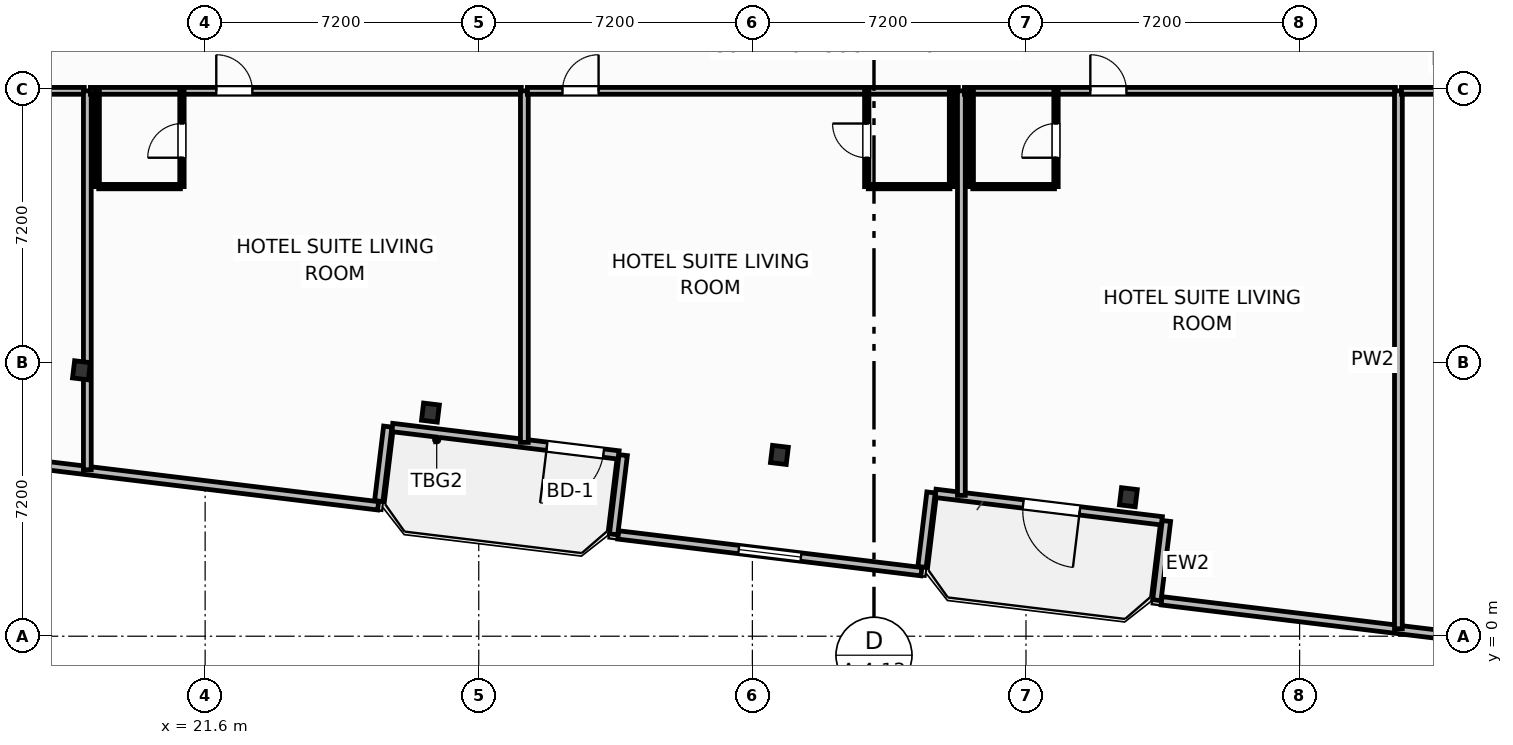
"""IFC4 building model, lengths in metres.
Left out: names, types, materials, properties, quantities, classifications, styles, units other than length and angle.
Written with IfcOpenShell. Run it as: python <this file> out.ifc"""

import sys

from ifc_helpers import new_model, si_unit, direction, frame, frame_2d, origin, origin_2d, place, context, subcontext, project, spatial, rectangle, i_section, extrude, element, fill, save


model = new_model("IFC4")
c1 = context("Model", 3, precision=1e-05, world=origin(), true_north=direction((0.0, 1.0)))
c2 = subcontext(c1, "Body", "Model", "MODEL_VIEW")
j1 = project(units=[si_unit("LENGTHUNIT", "METRE"), si_unit("PLANEANGLEUNIT", "RADIAN")], contexts=[c1])
p1 = place(None, origin())
s1 = spatial("IfcSite", under=j1, at=p1, CompositionType="ELEMENT")
p2 = place(p1, origin())
s2 = spatial("IfcBuilding", under=s1, at=p2, CompositionType="ELEMENT")
p3 = place(p2, frame((0.0, 0.0, 140.2)))
s3 = spatial("IfcBuildingStorey", under=s2, at=p3, CompositionType="ELEMENT", Elevation=140.2)
for number, where, z_axis, x_axis in (
    (1, (18.346, 6.997, 0.0), (0.0, 0.0, 1.0), (0.993, -0.12, 0.0)),
    (2, (27.529, 5.884, 0.0), (0.0, 0.0, 1.0), (0.993, -0.12, 0.0)),
    (3, (36.711, 4.77, 0.0), (0.0, 0.0, 1.0), (0.993, -0.12, 0.0)),
    (4, (45.894, 3.657, 0.0), (0.0, 0.0, 1.0), (0.993, -0.12, 0.0)),
):
    element("IfcColumn", number, at=place(p3, frame(where, z_axis=z_axis, x_axis=x_axis)), inside=s3, PredefinedType="COLUMN", context=c2, shape_type="SweptSolid", body=[
        extrude(i_section(OverallWidth=0.418, OverallDepth=0.455, WebThickness=0.042, FlangeThickness=0.068, FilletRadius=0.025, at=origin_2d()), origin(), (0.0, 0.0, 1.0), 3.7),
    ])
p4 = place(p3, frame((32.48, 4.77, 0.0), z_axis=(0.0, 0.0, 1.0), x_axis=(-0.992735402148, 0.120318000826, 0.0)))
e5 = element("IfcWall", 5, at=p4, inside=s3, PredefinedType="SOLIDWALL", context=c2, shape_type="SweptSolid", body=[
    extrude(rectangle(XDim=6.0, YDim=0.22, at=frame_2d((3.0, 0.0))), origin(), (0.0, 0.0, 1.0), 2.73),
])
p5 = place(p4, frame((0.4, 0.0, 0.0)))
e6 = element("IfcOpeningElement", 6, at=p5, cuts=e5, PredefinedType="OPENING", context=c2, shape_type="SweptSolid", body=[
    extrude(rectangle(XDim=1.5, YDim=2.25, at=frame_2d((0.75, 1.125))), frame((0.0, 0.12, 0.0), z_axis=(0.0, -1.0, 0.0), x_axis=(1.0, 0.0, 0.0)), (0.0, 0.0, 1.0), 0.24),
])
p6 = place(p3, frame((46.776, 3.037, 0.0), z_axis=(0.0, 0.0, 1.0), x_axis=(-0.992735402148, 0.120318000826, 0.0)))
e7 = element("IfcWall", 7, at=p6, inside=s3, PredefinedType="SOLIDWALL", context=c2, shape_type="SweptSolid", body=[
    extrude(rectangle(XDim=6.0, YDim=0.22, at=frame_2d((3.0, 0.0))), origin(), (0.0, 0.0, 1.0), 2.73),
])
p7 = place(p6, frame((2.176, 0.0, 0.0)))
e8 = element("IfcOpeningElement", 8, at=p7, cuts=e7, PredefinedType="OPENING", context=c2, shape_type="SweptSolid", body=[
    extrude(rectangle(XDim=1.5, YDim=2.25, at=frame_2d((0.75, 1.125))), frame((0.0, 0.12, 0.0), z_axis=(0.0, -1.0, 0.0), x_axis=(1.0, 0.0, 0.0)), (0.0, 0.0, 1.0), 0.24),
])
p8 = place(p3, frame((4.862, 6.012, 0.0), z_axis=(0.0, 0.0, 1.0), x_axis=(0.99273213367, -0.120344965739, 0.0)))
e9 = element("IfcWall", 9, at=p8, inside=s3, PredefinedType="SOLIDWALL", context=c2, shape_type="SweptSolid", body=[
    extrude(rectangle(XDim=21.447, YDim=0.22, at=frame_2d((10.724, 0.0))), origin(), (0.0, 0.0, 1.0), 2.73),
])
p9 = place(p8, frame((9.899, 0.0, 0.8)))
e10 = element("IfcOpeningElement", 10, at=p9, cuts=e9, PredefinedType="OPENING", context=c2, shape_type="SweptSolid", body=[
    extrude(rectangle(XDim=1.65, YDim=1.65, at=frame_2d((0.825, 0.825))), frame((0.0, 0.12, 0.0), z_axis=(0.0, -1.0, 0.0), x_axis=(1.0, 0.0, 0.0)), (0.0, 0.0, 1.0), 0.24),
])
p10 = place(p3, frame((26.168, 3.555, 0.0), z_axis=(0.0, 0.0, 1.0), x_axis=(0.120290754542, 0.992738703976, 0.0)))
e11 = element("IfcWall", 11, at=p10, inside=s3, PredefinedType="SOLIDWALL", context=c2, shape_type="SweptSolid", body=[
    extrude(rectangle(XDim=1.975, YDim=0.22, at=frame_2d((0.987, 0.0))), origin(), (0.0, 0.0, 1.0), 2.73),
])
p11 = place(p3, frame((32.601, 4.765, 0.0), z_axis=(0.0, 0.0, 1.0), x_axis=(-0.120327895535, -0.992734202874, 0.0)))
e12 = element("IfcWall", 12, at=p11, inside=s3, PredefinedType="SOLIDWALL", context=c2, shape_type="SweptSolid", body=[
    extrude(rectangle(XDim=2.1, YDim=0.22, at=frame_2d((1.05, 0.0))), origin(), (0.0, 0.0, 1.0), 2.73),
])
p12 = place(p3, frame((32.472, 2.665, 0.0), z_axis=(0.0, 0.0, 1.0), x_axis=(0.992734661931, -0.120324108143, 0.0)))
e13 = element("IfcWall", 13, at=p12, inside=s3, PredefinedType="SOLIDWALL", context=c2, shape_type="SweptSolid", body=[
    extrude(rectangle(XDim=8.035, YDim=0.22, at=frame_2d((4.018, 0.0))), origin(), (0.0, 0.0, 1.0), 2.73),
])
p13 = place(p12, frame((3.192, 0.0, 0.8)))
e14 = element("IfcOpeningElement", 14, at=p13, cuts=e13, PredefinedType="OPENING", context=c2, shape_type="SweptSolid", body=[
    extrude(rectangle(XDim=1.65, YDim=1.65, at=frame_2d((0.825, 0.825))), frame((0.0, 0.12, 0.0), z_axis=(0.0, -1.0, 0.0), x_axis=(1.0, 0.0, 0.0)), (0.0, 0.0, 1.0), 0.24),
])
p14 = place(p3, frame((40.464, 1.822, 0.0), z_axis=(0.0, 0.0, 1.0), x_axis=(0.120275992932, 0.992740492538, 0.0)))
e15 = element("IfcWall", 15, at=p14, inside=s3, PredefinedType="SOLIDWALL", context=c2, shape_type="SweptSolid", body=[
    extrude(rectangle(XDim=1.975, YDim=0.22, at=frame_2d((0.988, 0.0))), origin(), (0.0, 0.0, 1.0), 2.73),
])
p15 = place(p3, frame((46.896, 3.032, 0.0), z_axis=(0.0, 0.0, 1.0), x_axis=(-0.120327895535, -0.992734202874, 0.0)))
e16 = element("IfcWall", 16, at=p15, inside=s3, PredefinedType="SOLIDWALL", context=c2, shape_type="SweptSolid", body=[
    extrude(rectangle(XDim=2.1, YDim=0.22, at=frame_2d((1.05, 0.0))), origin(), (0.0, 0.0, 1.0), 2.73),
])
p16 = place(p3, frame((46.768, 0.932, 0.0), z_axis=(0.0, 0.0, 1.0), x_axis=(0.992733036814, -0.120337515419, 0.0)))
e17 = element("IfcWall", 17, at=p16, inside=s3, PredefinedType="SOLIDWALL", context=c2, shape_type="SweptSolid", body=[
    extrude(rectangle(XDim=21.347, YDim=0.22, at=frame_2d((10.673, 0.0))), origin(), (0.0, 0.0, 1.0), 2.73),
])
p17 = place(p16, frame((9.849, 0.0, 0.8)))
e18 = element("IfcOpeningElement", 18, at=p17, cuts=e17, PredefinedType="OPENING", context=c2, shape_type="SweptSolid", body=[
    extrude(rectangle(XDim=1.65, YDim=1.65, at=frame_2d((0.825, 0.825))), frame((0.0, 0.12, 0.0), z_axis=(0.0, -1.0, 0.0), x_axis=(1.0, 0.0, 0.0)), (0.0, 0.0, 1.0), 0.24),
])
p18 = place(p3, frame((0.581, 14.35, 0.0), z_axis=(0.0, 0.0, 1.0), x_axis=(1.0, 0.0, 0.0)))
e19 = element("IfcWall", 19, at=p18, inside=s3, PredefinedType="PARTITIONING", context=c2, shape_type="SweptSolid", body=[
    extrude(rectangle(XDim=17.839, YDim=0.18, at=frame_2d((8.919, 0.0))), origin(), (0.0, 0.0, 1.0), 3.45),
])
p19 = place(p18, frame((14.196, 0.0, 0.0)))
e20 = element("IfcOpeningElement", 20, at=p19, cuts=e19, PredefinedType="OPENING", context=c2, shape_type="SweptSolid", body=[
    extrude(rectangle(XDim=0.95, YDim=2.15, at=frame_2d((0.475, 1.075))), frame((0.0, 0.1, 0.0), z_axis=(0.0, -1.0, 0.0), x_axis=(1.0, 0.0, 0.0)), (0.0, 0.0, 1.0), 0.2),
])
p20 = place(p3, frame((18.5, 4.379, 0.0), z_axis=(0.0, 0.0, 1.0), x_axis=(0.0, 1.0, 0.0)))
e21 = element("IfcWall", 21, at=p20, inside=s3, PredefinedType="PARTITIONING", context=c2, shape_type="SweptSolid", body=[
    extrude(rectangle(XDim=9.971, YDim=0.205, at=frame_2d((4.985, 0.0))), origin(), (0.0, 0.0, 1.0), 3.45),
])
p21 = place(p3, frame((18.58, 14.35, 0.0), z_axis=(0.0, 0.0, 1.0), x_axis=(1.0, 0.0, 0.0)))
e22 = element("IfcWall", 22, at=p21, inside=s3, PredefinedType="PARTITIONING", context=c2, shape_type="SweptSolid", body=[
    extrude(rectangle(XDim=11.34, YDim=0.18, at=frame_2d((5.67, 0.0))), origin(), (0.0, 0.0, 1.0), 3.45),
])
p22 = place(p21, frame((3.313, 0.0, 0.0)))
e23 = element("IfcOpeningElement", 23, at=p22, cuts=e22, PredefinedType="OPENING", context=c2, shape_type="SweptSolid", body=[
    extrude(rectangle(XDim=0.95, YDim=2.15, at=frame_2d((0.475, 1.075))), frame((0.0, 0.1, 0.0), z_axis=(0.0, -1.0, 0.0), x_axis=(1.0, 0.0, 0.0)), (0.0, 0.0, 1.0), 0.2),
])
p23 = place(p3, frame((18.8, 11.83, 0.0), z_axis=(0.0, 0.0, 1.0), x_axis=(1.0, 0.0, 0.0)))
e24 = element("IfcWall", 24, at=p23, inside=s3, PredefinedType="PARTITIONING", context=c2, shape_type="SweptSolid", body=[
    extrude(rectangle(XDim=2.15, YDim=0.115, at=frame_2d((1.075, 0.0))), origin(), (0.0, 0.0, 1.0), 3.45),
])
p24 = place(p3, frame((20.99, 11.83, 0.0), z_axis=(0.0, 0.0, 1.0), x_axis=(0.0, 1.0, 0.0)))
e25 = element("IfcWall", 25, at=p24, inside=s3, PredefinedType="PARTITIONING", context=c2, shape_type="SweptSolid", body=[
    extrude(rectangle(XDim=2.52, YDim=0.115, at=frame_2d((1.26, 0.0))), origin(), (0.0, 0.0, 1.0), 3.45),
])
p25 = place(p24, frame((0.76, 0.0, 0.0)))
e26 = element("IfcOpeningElement", 26, at=p25, cuts=e25, PredefinedType="OPENING", context=c2, shape_type="SweptSolid", body=[
    extrude(rectangle(XDim=0.9, YDim=2.05, at=frame_2d((0.45, 1.025))), frame((0.0, 0.067, 0.0), z_axis=(0.0, -1.0, 0.0), x_axis=(1.0, 0.0, 0.0)), (0.0, 0.0, 1.0), 0.135),
])
p26 = place(p3, frame((18.76, 11.83, 0.0), z_axis=(0.0, 0.0, 1.0), x_axis=(0.0, 1.0, 0.0)))
e27 = element("IfcWall", 27, at=p26, inside=s3, PredefinedType="PARTITIONING", context=c2, shape_type="SweptSolid", body=[
    extrude(rectangle(XDim=2.52, YDim=0.115, at=frame_2d((1.26, 0.0))), origin(), (0.0, 0.0, 1.0), 3.45),
])
p27 = place(p3, frame((30.0, 5.1, 0.0), z_axis=(0.0, 0.0, 1.0), x_axis=(0.0, 1.0, 0.0)))
e28 = element("IfcWall", 28, at=p27, inside=s3, PredefinedType="PARTITIONING", context=c2, shape_type="SweptSolid", body=[
    extrude(rectangle(XDim=9.25, YDim=0.205, at=frame_2d((4.625, 0.0))), origin(), (0.0, 0.0, 1.0), 3.45),
])
p28 = place(p3, frame((30.08, 14.35, 0.0), z_axis=(0.0, 0.0, 1.0), x_axis=(1.0, 0.0, 0.0)))
e29 = element("IfcWall", 29, at=p28, inside=s3, PredefinedType="PARTITIONING", context=c2, shape_type="SweptSolid", body=[
    extrude(rectangle(XDim=11.34, YDim=0.18, at=frame_2d((5.67, 0.0))), origin(), (0.0, 0.0, 1.0), 3.45),
])
p29 = place(p28, frame((0.923, 0.0, 0.0)))
e30 = element("IfcOpeningElement", 30, at=p29, cuts=e29, PredefinedType="OPENING", context=c2, shape_type="SweptSolid", body=[
    extrude(rectangle(XDim=0.95, YDim=2.15, at=frame_2d((0.475, 1.075))), frame((0.0, 0.1, 0.0), z_axis=(0.0, -1.0, 0.0), x_axis=(1.0, 0.0, 0.0)), (0.0, 0.0, 1.0), 0.2),
])
p30 = place(p3, frame((39.05, 11.83, 0.0), z_axis=(0.0, 0.0, 1.0), x_axis=(1.0, 0.0, 0.0)))
e31 = element("IfcWall", 31, at=p30, inside=s3, PredefinedType="PARTITIONING", context=c2, shape_type="SweptSolid", body=[
    extrude(rectangle(XDim=2.15, YDim=0.115, at=frame_2d((1.075, 0.0))), origin(), (0.0, 0.0, 1.0), 3.45),
])
p31 = place(p3, frame((39.01, 11.83, 0.0), z_axis=(0.0, 0.0, 1.0), x_axis=(0.0, 1.0, 0.0)))
e32 = element("IfcWall", 32, at=p31, inside=s3, PredefinedType="PARTITIONING", context=c2, shape_type="SweptSolid", body=[
    extrude(rectangle(XDim=2.52, YDim=0.115, at=frame_2d((1.26, 0.0))), origin(), (0.0, 0.0, 1.0), 3.45),
])
p32 = place(p31, frame((0.76, 0.0, 0.0)))
e33 = element("IfcOpeningElement", 33, at=p32, cuts=e32, PredefinedType="OPENING", context=c2, shape_type="SweptSolid", body=[
    extrude(rectangle(XDim=0.9, YDim=2.05, at=frame_2d((0.45, 1.025))), frame((0.0, 0.067, 0.0), z_axis=(0.0, -1.0, 0.0), x_axis=(1.0, 0.0, 0.0)), (0.0, 0.0, 1.0), 0.135),
])
p33 = place(p3, frame((41.24, 11.83, 0.0), z_axis=(0.0, 0.0, 1.0), x_axis=(0.0, 1.0, 0.0)))
e34 = element("IfcWall", 34, at=p33, inside=s3, PredefinedType="PARTITIONING", context=c2, shape_type="SweptSolid", body=[
    extrude(rectangle(XDim=2.52, YDim=0.115, at=frame_2d((1.26, 0.0))), origin(), (0.0, 0.0, 1.0), 3.45),
])
p34 = place(p3, frame((41.5, 3.706, 0.0), z_axis=(0.0, 0.0, 1.0), x_axis=(0.0, 1.0, 0.0)))
e35 = element("IfcWall", 35, at=p34, inside=s3, PredefinedType="PARTITIONING", context=c2, shape_type="SweptSolid", body=[
    extrude(rectangle(XDim=10.644, YDim=0.205, at=frame_2d((5.322, 0.0))), origin(), (0.0, 0.0, 1.0), 3.45),
])
p35 = place(p3, frame((41.58, 14.35, 0.0), z_axis=(0.0, 0.0, 1.0), x_axis=(1.0, 0.0, 0.0)))
e36 = element("IfcWall", 36, at=p35, inside=s3, PredefinedType="PARTITIONING", context=c2, shape_type="SweptSolid", body=[
    extrude(rectangle(XDim=11.34, YDim=0.18, at=frame_2d((5.67, 0.0))), origin(), (0.0, 0.0, 1.0), 3.45),
])
p36 = place(p35, frame((3.313, 0.0, 0.0)))
e37 = element("IfcOpeningElement", 37, at=p36, cuts=e36, PredefinedType="OPENING", context=c2, shape_type="SweptSolid", body=[
    extrude(rectangle(XDim=0.95, YDim=2.15, at=frame_2d((0.475, 1.075))), frame((0.0, 0.1, 0.0), z_axis=(0.0, -1.0, 0.0), x_axis=(1.0, 0.0, 0.0)), (0.0, 0.0, 1.0), 0.2),
])
p37 = place(p3, frame((41.8, 11.83, 0.0), z_axis=(0.0, 0.0, 1.0), x_axis=(1.0, 0.0, 0.0)))
e38 = element("IfcWall", 38, at=p37, inside=s3, PredefinedType="PARTITIONING", context=c2, shape_type="SweptSolid", body=[
    extrude(rectangle(XDim=2.15, YDim=0.115, at=frame_2d((1.075, 0.0))), origin(), (0.0, 0.0, 1.0), 3.45),
])
p38 = place(p3, frame((43.99, 11.83, 0.0), z_axis=(0.0, 0.0, 1.0), x_axis=(0.0, 1.0, 0.0)))
e39 = element("IfcWall", 39, at=p38, inside=s3, PredefinedType="PARTITIONING", context=c2, shape_type="SweptSolid", body=[
    extrude(rectangle(XDim=2.52, YDim=0.115, at=frame_2d((1.26, 0.0))), origin(), (0.0, 0.0, 1.0), 3.45),
])
p39 = place(p38, frame((0.76, 0.0, 0.0)))
e40 = element("IfcOpeningElement", 40, at=p39, cuts=e39, PredefinedType="OPENING", context=c2, shape_type="SweptSolid", body=[
    extrude(rectangle(XDim=0.9, YDim=2.05, at=frame_2d((0.45, 1.025))), frame((0.0, 0.067, 0.0), z_axis=(0.0, -1.0, 0.0), x_axis=(1.0, 0.0, 0.0)), (0.0, 0.0, 1.0), 0.135),
])
p40 = place(p3, frame((41.76, 11.83, 0.0), z_axis=(0.0, 0.0, 1.0), x_axis=(0.0, 1.0, 0.0)))
e41 = element("IfcWall", 41, at=p40, inside=s3, PredefinedType="PARTITIONING", context=c2, shape_type="SweptSolid", body=[
    extrude(rectangle(XDim=2.52, YDim=0.115, at=frame_2d((1.26, 0.0))), origin(), (0.0, 0.0, 1.0), 3.45),
])
p41 = place(p3, frame((53.0, 0.197, 0.0), z_axis=(0.0, 0.0, 1.0), x_axis=(0.0, 1.0, 0.0)))
e42 = element("IfcWall", 42, at=p41, inside=s3, PredefinedType="PARTITIONING", context=c2, shape_type="SweptSolid", body=[
    extrude(rectangle(XDim=14.153, YDim=0.205, at=frame_2d((7.077, 0.0))), origin(), (0.0, 0.0, 1.0), 3.45),
])
p42 = place(p3, frame((53.08, 14.35, 0.0), z_axis=(0.0, 0.0, 1.0), x_axis=(1.0, 0.0, 0.0)))
e43 = element("IfcWall", 43, at=p42, inside=s3, PredefinedType="PARTITIONING", context=c2, shape_type="SweptSolid", body=[
    extrude(rectangle(XDim=22.084, YDim=0.18, at=frame_2d((11.042, 0.0))), origin(), (0.0, 0.0, 1.0), 3.45),
])
p43 = place(p42, frame((0.937, 0.0, 0.0)))
e44 = element("IfcOpeningElement", 44, at=p43, cuts=e43, PredefinedType="OPENING", context=c2, shape_type="SweptSolid", body=[
    extrude(rectangle(XDim=0.95, YDim=2.15, at=frame_2d((0.475, 1.075))), frame((0.0, 0.1, 0.0), z_axis=(0.0, -1.0, 0.0), x_axis=(1.0, 0.0, 0.0)), (0.0, 0.0, 1.0), 0.2),
])
p44 = place(p5, origin())
e45 = element("IfcDoor", 45, at=p44, inside=s3, OperationType="SINGLE_SWING_RIGHT", PredefinedType="DOOR", context=c2, shape_type="SweptSolid", body=[
    extrude(rectangle(XDim=1.5, YDim=2.25, at=frame_2d((0.75, 1.125))), frame((0.0, 0.025, 0.0), z_axis=(0.0, -1.0, 0.0), x_axis=(1.0, 0.0, 0.0)), (0.0, 0.0, 1.0), 0.05),
])
fill(e6, e45)
p45 = place(p7, origin())
e46 = element("IfcDoor", 46, at=p45, inside=s3, OperationType="SINGLE_SWING_LEFT", PredefinedType="DOOR", context=c2, shape_type="SweptSolid", body=[
    extrude(rectangle(XDim=1.5, YDim=2.25, at=frame_2d((0.75, 1.125))), frame((0.0, 0.025, 0.0), z_axis=(0.0, -1.0, 0.0), x_axis=(1.0, 0.0, 0.0)), (0.0, 0.0, 1.0), 0.05),
])
fill(e8, e46)
p46 = place(p13, origin())
e47 = element("IfcWindow", 47, at=p46, inside=s3, PartitioningType="SINGLE_PANEL", PredefinedType="WINDOW", context=c2, shape_type="SweptSolid", body=[
    extrude(rectangle(XDim=1.65, YDim=1.65, at=frame_2d((0.825, 0.825))), frame((0.0, 0.03, 0.0), z_axis=(0.0, -1.0, 0.0), x_axis=(1.0, 0.0, 0.0)), (0.0, 0.0, 1.0), 0.06),
])
fill(e14, e47)
p47 = place(p22, origin())
e48 = element("IfcDoor", 48, at=p47, inside=s3, OperationType="SINGLE_SWING_LEFT", PredefinedType="DOOR", context=c2, shape_type="SweptSolid", body=[
    extrude(rectangle(XDim=0.95, YDim=2.15, at=frame_2d((0.475, 1.075))), frame((0.0, 0.025, 0.0), z_axis=(0.0, -1.0, 0.0), x_axis=(1.0, 0.0, 0.0)), (0.0, 0.0, 1.0), 0.05),
])
fill(e23, e48)
p48 = place(p25, origin())
e49 = element("IfcDoor", 49, at=p48, inside=s3, OperationType="SINGLE_SWING_LEFT", PredefinedType="DOOR", context=c2, shape_type="SweptSolid", body=[
    extrude(rectangle(XDim=0.9, YDim=2.05, at=frame_2d((0.45, 1.025))), frame((0.0, 0.025, 0.0), z_axis=(0.0, -1.0, 0.0), x_axis=(1.0, 0.0, 0.0)), (0.0, 0.0, 1.0), 0.05),
])
fill(e26, e49)
p49 = place(p29, origin())
e50 = element("IfcDoor", 50, at=p49, inside=s3, OperationType="SINGLE_SWING_RIGHT", PredefinedType="DOOR", context=c2, shape_type="SweptSolid", body=[
    extrude(rectangle(XDim=0.95, YDim=2.15, at=frame_2d((0.475, 1.075))), frame((0.0, 0.025, 0.0), z_axis=(0.0, -1.0, 0.0), x_axis=(1.0, 0.0, 0.0)), (0.0, 0.0, 1.0), 0.05),
])
fill(e30, e50)
p50 = place(p32, origin())
e51 = element("IfcDoor", 51, at=p50, inside=s3, OperationType="SINGLE_SWING_RIGHT", PredefinedType="DOOR", context=c2, shape_type="SweptSolid", body=[
    extrude(rectangle(XDim=0.9, YDim=2.05, at=frame_2d((0.45, 1.025))), frame((0.0, 0.025, 0.0), z_axis=(0.0, -1.0, 0.0), x_axis=(1.0, 0.0, 0.0)), (0.0, 0.0, 1.0), 0.05),
])
fill(e33, e51)
p51 = place(p36, origin())
e52 = element("IfcDoor", 52, at=p51, inside=s3, OperationType="SINGLE_SWING_LEFT", PredefinedType="DOOR", context=c2, shape_type="SweptSolid", body=[
    extrude(rectangle(XDim=0.95, YDim=2.15, at=frame_2d((0.475, 1.075))), frame((0.0, 0.025, 0.0), z_axis=(0.0, -1.0, 0.0), x_axis=(1.0, 0.0, 0.0)), (0.0, 0.0, 1.0), 0.05),
])
fill(e37, e52)
p52 = place(p39, origin())
e53 = element("IfcDoor", 53, at=p52, inside=s3, OperationType="SINGLE_SWING_LEFT", PredefinedType="DOOR", context=c2, shape_type="SweptSolid", body=[
    extrude(rectangle(XDim=0.9, YDim=2.05, at=frame_2d((0.45, 1.025))), frame((0.0, 0.025, 0.0), z_axis=(0.0, -1.0, 0.0), x_axis=(1.0, 0.0, 0.0)), (0.0, 0.0, 1.0), 0.05),
])
fill(e40, e53)
save(model, sys.argv[1])
